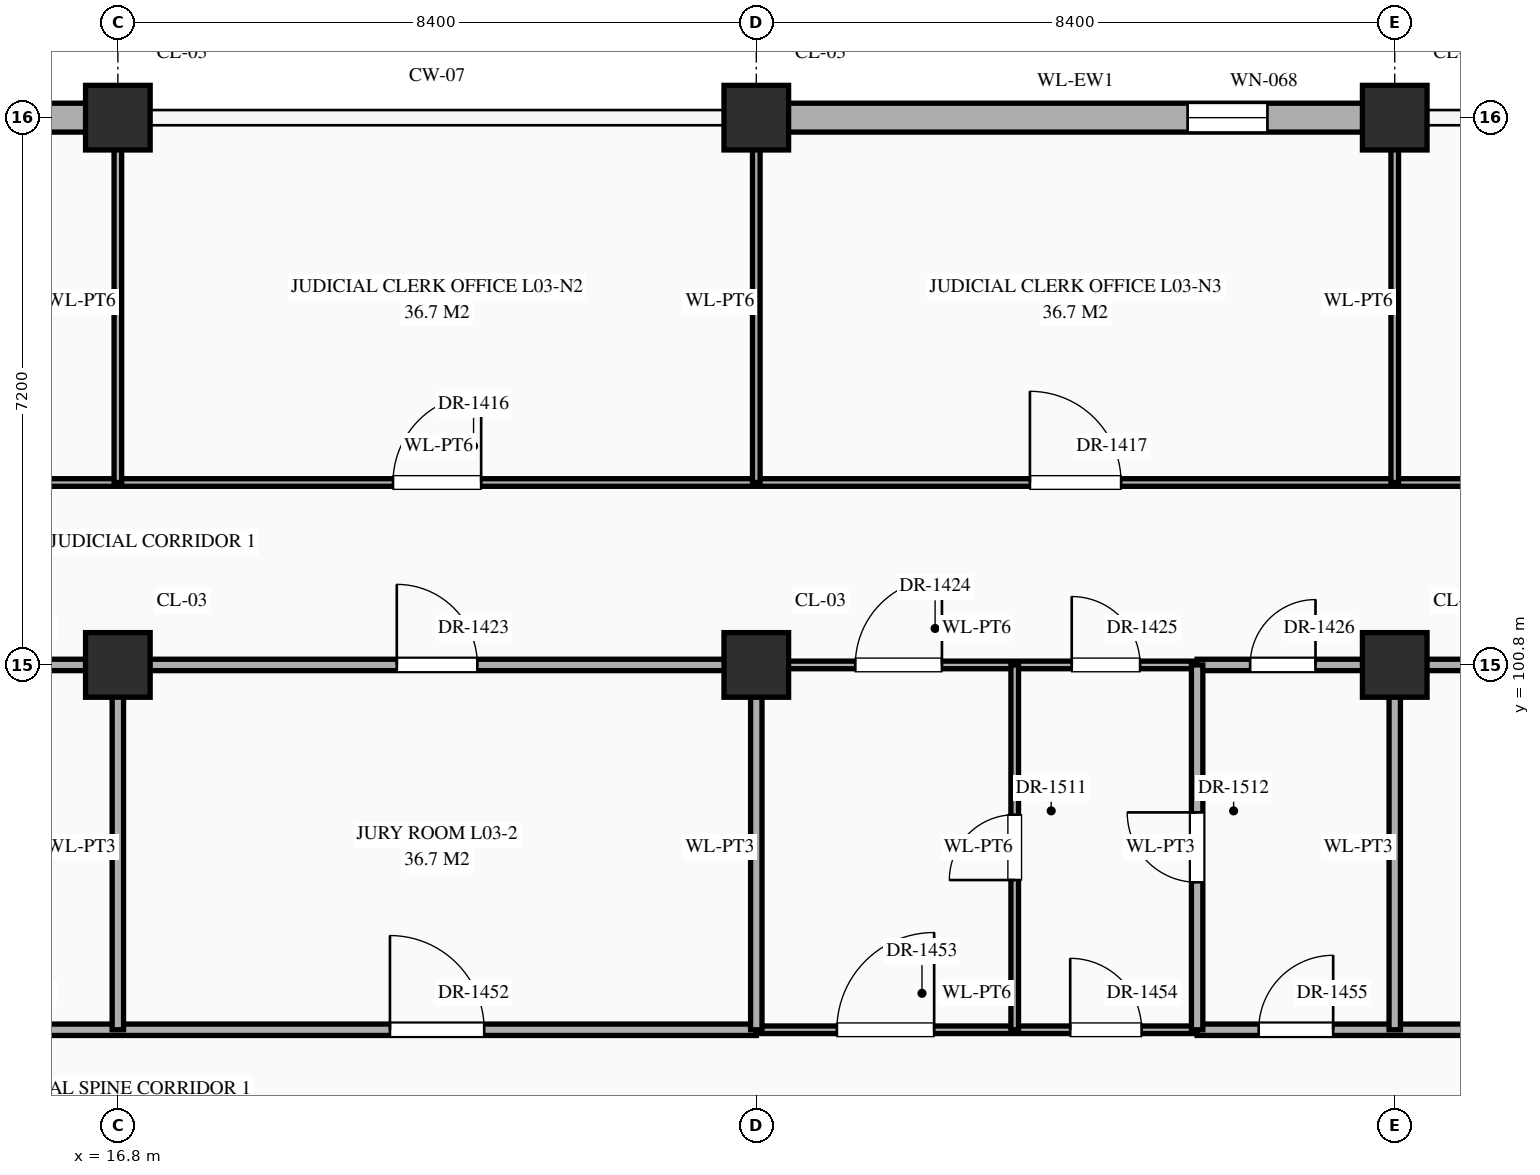
"""IFC4 building model, lengths in metres.
Left out: names, types, materials, properties, quantities, classifications, styles, units other than length and angle.
Written with IfcOpenShell. Run it as: python <this file> out.ifc"""

import sys

from ifc_helpers import new_model, si_unit, direction, frame, frame_2d, origin, origin_2d, place, context, subcontext, project, spatial, rectangle, extrude, element, fill, save


model = new_model("IFC4")
c1 = context("Model", 3, precision=1e-05, world=origin(), true_north=direction((0.0, 1.0)))
c2 = subcontext(c1, "Body", "Model", "MODEL_VIEW")
j1 = project(units=[si_unit("LENGTHUNIT", "METRE"), si_unit("PLANEANGLEUNIT", "RADIAN")], contexts=[c1])
p1 = place(None, origin())
s1 = spatial("IfcSite", under=j1, at=p1, CompositionType="ELEMENT")
p2 = place(p1, origin())
s2 = spatial("IfcBuilding", under=s1, at=p2, CompositionType="ELEMENT")
p3 = place(p2, frame((0.0, 0.0, 10.8)))
s3 = spatial("IfcBuildingStorey", under=s2, at=p3, CompositionType="ELEMENT", Elevation=10.8)
for number, where, z_axis, x_axis in (
    (1, (16.8, 100.8, 0.0), (0.0, 0.0, 1.0), (1.0, 0.0, 0.0)),
    (2, (16.8, 108.0, 0.0), (0.0, 0.0, 1.0), (1.0, 0.0, 0.0)),
    (3, (25.2, 100.8, 0.0), (0.0, 0.0, 1.0), (1.0, 0.0, 0.0)),
    (4, (25.2, 108.0, 0.0), (0.0, 0.0, 1.0), (1.0, 0.0, 0.0)),
    (5, (33.6, 100.8, 0.0), (0.0, 0.0, 1.0), (1.0, 0.0, 0.0)),
    (6, (33.6, 108.0, 0.0), (0.0, 0.0, 1.0), (1.0, 0.0, 0.0)),
):
    element("IfcColumn", number, at=place(p3, frame(where, z_axis=z_axis, x_axis=x_axis)), inside=s3, PredefinedType="COLUMN", context=c2, shape_type="SweptSolid", body=[
        extrude(rectangle(XDim=0.85, YDim=0.85, at=origin_2d()), origin(), (0.0, 0.0, 1.0), 5.4),
    ])
p4 = place(p3, frame((8.82, 108.0, 0.0), z_axis=(0.0, 0.0, 1.0), x_axis=(1.0, 0.0, 0.0)))
e7 = element("IfcWall", 7, at=p4, inside=s3, PredefinedType="STANDARD", context=c2, shape_type="SweptSolid", body=[
    extrude(rectangle(XDim=7.56, YDim=0.38, at=frame_2d((3.78, 0.0))), origin(), (0.0, 0.0, 1.0), 4.47),
])
p5 = place(p4, frame((5.33, 0.0, 0.85)))
e8 = element("IfcOpeningElement", 8, at=p5, cuts=e7, PredefinedType="OPENING", context=c2, shape_type="SweptSolid", body=[
    extrude(rectangle(XDim=0.9, YDim=1.92, at=frame_2d((0.45, 0.96))), frame((0.0, 0.202, 0.0), z_axis=(0.0, -1.0, 0.0), x_axis=(1.0, 0.0, 0.0)), (0.0, 0.0, 1.0), 0.404),
])
p6 = place(p3, frame((25.62, 108.0, 0.0), z_axis=(0.0, 0.0, 1.0), x_axis=(1.0, 0.0, 0.0)))
e9 = element("IfcWall", 9, at=p6, inside=s3, PredefinedType="STANDARD", context=c2, shape_type="SweptSolid", body=[
    extrude(rectangle(XDim=7.56, YDim=0.38, at=frame_2d((3.78, 0.0))), origin(), (0.0, 0.0, 1.0), 4.47),
])
p7 = place(p6, frame((5.255, 0.0, 0.85)))
e10 = element("IfcOpeningElement", 10, at=p7, cuts=e9, PredefinedType="OPENING", context=c2, shape_type="SweptSolid", body=[
    extrude(rectangle(XDim=1.05, YDim=1.2, at=frame_2d((0.525, 0.6))), frame((0.0, 0.202, 0.0), z_axis=(0.0, -1.0, 0.0), x_axis=(1.0, 0.0, 0.0)), (0.0, 0.0, 1.0), 0.404),
])
p8 = place(p3, frame((5.8, 96.0, 0.0), z_axis=(0.0, 0.0, 1.0), x_axis=(1.0, 0.0, 0.0)))
e11 = element("IfcWall", 11, at=p8, inside=s3, PredefinedType="STANDARD", context=c2, shape_type="SweptSolid", body=[
    extrude(rectangle(XDim=19.4, YDim=0.15, at=frame_2d((9.7, 0.0))), origin(), (0.0, 0.0, 1.0), 5.12),
])
p9 = place(p8, frame((0.72, 0.0, 0.0)))
e12 = element("IfcOpeningElement", 12, at=p9, cuts=e11, PredefinedType="OPENING", context=c2, shape_type="SweptSolid", body=[
    extrude(rectangle(XDim=1.16, YDim=2.3, at=frame_2d((0.58, 1.15))), frame((0.0, 0.087, 0.0), z_axis=(0.0, -1.0, 0.0), x_axis=(1.0, 0.0, 0.0)), (0.0, 0.0, 1.0), 0.174),
])
p10 = place(p8, frame((6.2, 0.0, 0.0)))
e13 = element("IfcOpeningElement", 13, at=p10, cuts=e11, PredefinedType="OPENING", context=c2, shape_type="SweptSolid", body=[
    extrude(rectangle(XDim=1.2, YDim=2.35, at=frame_2d((0.6, 1.175))), frame((0.0, 0.087, 0.0), z_axis=(0.0, -1.0, 0.0), x_axis=(1.0, 0.0, 0.0)), (0.0, 0.0, 1.0), 0.174),
])
p11 = place(p8, frame((14.58, 0.0, 0.0)))
e14 = element("IfcOpeningElement", 14, at=p11, cuts=e11, PredefinedType="OPENING", context=c2, shape_type="SweptSolid", body=[
    extrude(rectangle(XDim=1.24, YDim=2.3, at=frame_2d((0.62, 1.15))), frame((0.0, 0.087, 0.0), z_axis=(0.0, -1.0, 0.0), x_axis=(1.0, 0.0, 0.0)), (0.0, 0.0, 1.0), 0.174),
])
p12 = place(p3, frame((25.2, 96.0, 0.0), z_axis=(0.0, 0.0, 1.0), x_axis=(1.0, 0.0, 0.0)))
e15 = element("IfcWall", 15, at=p12, inside=s3, PredefinedType="STANDARD", context=c2, shape_type="SweptSolid", body=[
    extrude(rectangle(XDim=5.8, YDim=0.1, at=frame_2d((2.9, 0.0))), origin(), (0.0, 0.0, 1.0), 5.12),
])
p13 = place(p12, frame((1.06, 0.0, 0.0)))
e16 = element("IfcOpeningElement", 16, at=p13, cuts=e15, PredefinedType="OPENING", context=c2, shape_type="SweptSolid", body=[
    extrude(rectangle(XDim=1.28, YDim=2.35, at=frame_2d((0.64, 1.175))), frame((0.0, 0.062, 0.0), z_axis=(0.0, -1.0, 0.0), x_axis=(1.0, 0.0, 0.0)), (0.0, 0.0, 1.0), 0.124),
])
p14 = place(p12, frame((4.13, 0.0, 0.0)))
e17 = element("IfcOpeningElement", 17, at=p14, cuts=e15, PredefinedType="OPENING", context=c2, shape_type="SweptSolid", body=[
    extrude(rectangle(XDim=0.94, YDim=2.3, at=frame_2d((0.47, 1.15))), frame((0.0, 0.062, 0.0), z_axis=(0.0, -1.0, 0.0), x_axis=(1.0, 0.0, 0.0)), (0.0, 0.0, 1.0), 0.124),
])
p15 = place(p3, frame((31.0, 96.0, 0.0), z_axis=(0.0, 0.0, 1.0), x_axis=(1.0, 0.0, 0.0)))
e18 = element("IfcWall", 18, at=p15, inside=s3, PredefinedType="STANDARD", context=c2, shape_type="SweptSolid", body=[
    extrude(rectangle(XDim=19.4, YDim=0.15, at=frame_2d((9.7, 0.0))), origin(), (0.0, 0.0, 1.0), 5.12),
])
p16 = place(p15, frame((0.81, 0.0, 0.0)))
e19 = element("IfcOpeningElement", 19, at=p16, cuts=e18, PredefinedType="OPENING", context=c2, shape_type="SweptSolid", body=[
    extrude(rectangle(XDim=0.98, YDim=2.35, at=frame_2d((0.49, 1.175))), frame((0.0, 0.087, 0.0), z_axis=(0.0, -1.0, 0.0), x_axis=(1.0, 0.0, 0.0)), (0.0, 0.0, 1.0), 0.174),
])
p17 = place(p15, frame((6.29, 0.0, 0.0)))
e20 = element("IfcOpeningElement", 20, at=p17, cuts=e18, PredefinedType="OPENING", context=c2, shape_type="SweptSolid", body=[
    extrude(rectangle(XDim=1.02, YDim=2.4, at=frame_2d((0.51, 1.2))), frame((0.0, 0.087, 0.0), z_axis=(0.0, -1.0, 0.0), x_axis=(1.0, 0.0, 0.0)), (0.0, 0.0, 1.0), 0.174),
])
p18 = place(p15, frame((14.67, 0.0, 0.0)))
e21 = element("IfcOpeningElement", 21, at=p18, cuts=e18, PredefinedType="OPENING", context=c2, shape_type="SweptSolid", body=[
    extrude(rectangle(XDim=1.06, YDim=2.4, at=frame_2d((0.53, 1.2))), frame((0.0, 0.087, 0.0), z_axis=(0.0, -1.0, 0.0), x_axis=(1.0, 0.0, 0.0)), (0.0, 0.0, 1.0), 0.174),
])
p19 = place(p3, frame((5.8, 100.8, 0.0), z_axis=(0.0, 0.0, 1.0), x_axis=(1.0, 0.0, 0.0)))
e22 = element("IfcWall", 22, at=p19, inside=s3, PredefinedType="STANDARD", context=c2, shape_type="SweptSolid", body=[
    extrude(rectangle(XDim=19.4, YDim=0.15, at=frame_2d((9.7, 0.0))), origin(), (0.0, 0.0, 1.0), 4.27),
])
p20 = place(p19, frame((0.637, 0.0, 0.0)))
e23 = element("IfcOpeningElement", 23, at=p20, cuts=e22, PredefinedType="OPENING", context=c2, shape_type="SweptSolid", body=[
    extrude(rectangle(XDim=0.98, YDim=2.35, at=frame_2d((0.49, 1.175))), frame((0.0, 0.087, 0.0), z_axis=(0.0, -1.0, 0.0), x_axis=(1.0, 0.0, 0.0)), (0.0, 0.0, 1.0), 0.174),
])
p21 = place(p19, frame((6.29, 0.0, 0.0)))
e24 = element("IfcOpeningElement", 24, at=p21, cuts=e22, PredefinedType="OPENING", context=c2, shape_type="SweptSolid", body=[
    extrude(rectangle(XDim=1.02, YDim=2.4, at=frame_2d((0.51, 1.2))), frame((0.0, 0.087, 0.0), z_axis=(0.0, -1.0, 0.0), x_axis=(1.0, 0.0, 0.0)), (0.0, 0.0, 1.0), 0.174),
])
p22 = place(p19, frame((14.67, 0.0, 0.0)))
e25 = element("IfcOpeningElement", 25, at=p22, cuts=e22, PredefinedType="OPENING", context=c2, shape_type="SweptSolid", body=[
    extrude(rectangle(XDim=1.06, YDim=2.4, at=frame_2d((0.53, 1.2))), frame((0.0, 0.087, 0.0), z_axis=(0.0, -1.0, 0.0), x_axis=(1.0, 0.0, 0.0)), (0.0, 0.0, 1.0), 0.174),
])
p23 = place(p3, frame((25.2, 100.8, 0.0), z_axis=(0.0, 0.0, 1.0), x_axis=(1.0, 0.0, 0.0)))
e26 = element("IfcWall", 26, at=p23, inside=s3, PredefinedType="STANDARD", context=c2, shape_type="SweptSolid", body=[
    extrude(rectangle(XDim=5.8, YDim=0.1, at=frame_2d((2.9, 0.0))), origin(), (0.0, 0.0, 1.0), 4.27),
])
p24 = place(p23, frame((1.302, 0.0, 0.0)))
e27 = element("IfcOpeningElement", 27, at=p24, cuts=e26, PredefinedType="OPENING", context=c2, shape_type="SweptSolid", body=[
    extrude(rectangle(XDim=1.14, YDim=2.4, at=frame_2d((0.57, 1.2))), frame((0.0, 0.062, 0.0), z_axis=(0.0, -1.0, 0.0), x_axis=(1.0, 0.0, 0.0)), (0.0, 0.0, 1.0), 0.124),
])
p25 = place(p23, frame((4.15, 0.0, 0.0)))
e28 = element("IfcOpeningElement", 28, at=p25, cuts=e26, PredefinedType="OPENING", context=c2, shape_type="SweptSolid", body=[
    extrude(rectangle(XDim=0.9, YDim=2.15, at=frame_2d((0.45, 1.075))), frame((0.0, 0.062, 0.0), z_axis=(0.0, -1.0, 0.0), x_axis=(1.0, 0.0, 0.0)), (0.0, 0.0, 1.0), 0.124),
])
p26 = place(p3, frame((31.0, 100.8, 0.0), z_axis=(0.0, 0.0, 1.0), x_axis=(1.0, 0.0, 0.0)))
e29 = element("IfcWall", 29, at=p26, inside=s3, PredefinedType="STANDARD", context=c2, shape_type="SweptSolid", body=[
    extrude(rectangle(XDim=11.0, YDim=0.15, at=frame_2d((5.5, 0.0))), origin(), (0.0, 0.0, 1.0), 4.27),
])
p27 = place(p26, frame((0.698, 0.0, 0.0)))
e30 = element("IfcOpeningElement", 30, at=p27, cuts=e29, PredefinedType="OPENING", context=c2, shape_type="SweptSolid", body=[
    extrude(rectangle(XDim=0.86, YDim=2.1, at=frame_2d((0.43, 1.05))), frame((0.0, 0.087, 0.0), z_axis=(0.0, -1.0, 0.0), x_axis=(1.0, 0.0, 0.0)), (0.0, 0.0, 1.0), 0.174),
])
p28 = place(p26, frame((6.34, 0.0, 0.0)))
e31 = element("IfcOpeningElement", 31, at=p28, cuts=e29, PredefinedType="OPENING", context=c2, shape_type="SweptSolid", body=[
    extrude(rectangle(XDim=0.92, YDim=2.15, at=frame_2d((0.46, 1.075))), frame((0.0, 0.087, 0.0), z_axis=(0.0, -1.0, 0.0), x_axis=(1.0, 0.0, 0.0)), (0.0, 0.0, 1.0), 0.174),
])
p29 = place(p3, frame((0.04, 103.2, 0.0), z_axis=(0.0, 0.0, 1.0), x_axis=(1.0, 0.0, 0.0)))
e32 = element("IfcWall", 32, at=p29, inside=s3, PredefinedType="STANDARD", context=c2, shape_type="SweptSolid", body=[
    extrude(rectangle(XDim=41.96, YDim=0.1, at=frame_2d((20.98, 0.0))), origin(), (0.0, 0.0, 1.0), 5.12),
])
p30 = place(p29, frame((3.64, 0.0, 0.0)))
e33 = element("IfcOpeningElement", 33, at=p30, cuts=e32, PredefinedType="OPENING", context=c2, shape_type="SweptSolid", body=[
    extrude(rectangle(XDim=1.08, YDim=2.25, at=frame_2d((0.54, 1.125))), frame((0.0, 0.062, 0.0), z_axis=(0.0, -1.0, 0.0), x_axis=(1.0, 0.0, 0.0)), (0.0, 0.0, 1.0), 0.124),
])
p31 = place(p29, frame((12.0, 0.0, 0.0)))
e34 = element("IfcOpeningElement", 34, at=p31, cuts=e32, PredefinedType="OPENING", context=c2, shape_type="SweptSolid", body=[
    extrude(rectangle(XDim=1.12, YDim=2.25, at=frame_2d((0.56, 1.125))), frame((0.0, 0.062, 0.0), z_axis=(0.0, -1.0, 0.0), x_axis=(1.0, 0.0, 0.0)), (0.0, 0.0, 1.0), 0.124),
])
p32 = place(p29, frame((20.38, 0.0, 0.0)))
e35 = element("IfcOpeningElement", 35, at=p32, cuts=e32, PredefinedType="OPENING", context=c2, shape_type="SweptSolid", body=[
    extrude(rectangle(XDim=1.16, YDim=2.3, at=frame_2d((0.58, 1.15))), frame((0.0, 0.062, 0.0), z_axis=(0.0, -1.0, 0.0), x_axis=(1.0, 0.0, 0.0)), (0.0, 0.0, 1.0), 0.124),
])
p33 = place(p29, frame((28.76, 0.0, 0.0)))
e36 = element("IfcOpeningElement", 36, at=p33, cuts=e32, PredefinedType="OPENING", context=c2, shape_type="SweptSolid", body=[
    extrude(rectangle(XDim=1.2, YDim=2.35, at=frame_2d((0.6, 1.175))), frame((0.0, 0.062, 0.0), z_axis=(0.0, -1.0, 0.0), x_axis=(1.0, 0.0, 0.0)), (0.0, 0.0, 1.0), 0.124),
])
p34 = place(p29, frame((37.14, 0.0, 0.0)))
e37 = element("IfcOpeningElement", 37, at=p34, cuts=e32, PredefinedType="OPENING", context=c2, shape_type="SweptSolid", body=[
    extrude(rectangle(XDim=1.24, YDim=2.3, at=frame_2d((0.62, 1.15))), frame((0.0, 0.062, 0.0), z_axis=(0.0, -1.0, 0.0), x_axis=(1.0, 0.0, 0.0)), (0.0, 0.0, 1.0), 0.124),
])
p35 = place(p3, frame((16.8, 96.0, 0.0), z_axis=(0.0, 0.0, 1.0), x_axis=(0.0, 1.0, 0.0)))
e38 = element("IfcWall", 38, at=p35, inside=s3, PredefinedType="STANDARD", context=c2, shape_type="SweptSolid", body=[
    extrude(rectangle(XDim=4.8, YDim=0.15, at=frame_2d((2.4, 0.0))), origin(), (0.0, 0.0, 1.0), 4.37),
])
p36 = place(p3, frame((16.8, 103.2, 0.0), z_axis=(0.0, 0.0, 1.0), x_axis=(0.0, 1.0, 0.0)))
e39 = element("IfcWall", 39, at=p36, inside=s3, PredefinedType="STANDARD", context=c2, shape_type="SweptSolid", body=[
    extrude(rectangle(XDim=4.76, YDim=0.1, at=frame_2d((2.38, 0.0))), origin(), (0.0, 0.0, 1.0), 4.37),
])
p37 = place(p3, frame((25.2, 96.0, 0.0), z_axis=(0.0, 0.0, 1.0), x_axis=(0.0, 1.0, 0.0)))
e40 = element("IfcWall", 40, at=p37, inside=s3, PredefinedType="STANDARD", context=c2, shape_type="SweptSolid", body=[
    extrude(rectangle(XDim=4.8, YDim=0.15, at=frame_2d((2.4, 0.0))), origin(), (0.0, 0.0, 1.0), 4.37),
])
p38 = place(p3, frame((25.2, 103.2, 0.0), z_axis=(0.0, 0.0, 1.0), x_axis=(0.0, 1.0, 0.0)))
e41 = element("IfcWall", 41, at=p38, inside=s3, PredefinedType="STANDARD", context=c2, shape_type="SweptSolid", body=[
    extrude(rectangle(XDim=4.76, YDim=0.1, at=frame_2d((2.38, 0.0))), origin(), (0.0, 0.0, 1.0), 4.37),
])
p39 = place(p3, frame((28.6, 96.0, 0.0), z_axis=(0.0, 0.0, 1.0), x_axis=(0.0, 1.0, 0.0)))
e42 = element("IfcWall", 42, at=p39, inside=s3, PredefinedType="STANDARD", context=c2, shape_type="SweptSolid", body=[
    extrude(rectangle(XDim=4.8, YDim=0.1, at=frame_2d((2.4, 0.0))), origin(), (0.0, 0.0, 1.0), 5.12),
])
p40 = place(p39, frame((1.97, 0.0, 0.0)))
e43 = element("IfcOpeningElement", 43, at=p40, cuts=e42, PredefinedType="OPENING", context=c2, shape_type="SweptSolid", body=[
    extrude(rectangle(XDim=0.86, YDim=2.1, at=frame_2d((0.43, 1.05))), frame((0.0, 0.062, 0.0), z_axis=(0.0, -1.0, 0.0), x_axis=(1.0, 0.0, 0.0)), (0.0, 0.0, 1.0), 0.124),
])
p41 = place(p3, frame((31.0, 96.0, 0.0), z_axis=(0.0, 0.0, 1.0), x_axis=(0.0, 1.0, 0.0)))
e44 = element("IfcWall", 44, at=p41, inside=s3, PredefinedType="STANDARD", context=c2, shape_type="SweptSolid", body=[
    extrude(rectangle(XDim=4.8, YDim=0.15, at=frame_2d((2.4, 0.0))), origin(), (0.0, 0.0, 1.0), 5.12),
])
p42 = place(p41, frame((1.94, 0.0, 0.0)))
e45 = element("IfcOpeningElement", 45, at=p42, cuts=e44, PredefinedType="OPENING", context=c2, shape_type="SweptSolid", body=[
    extrude(rectangle(XDim=0.92, YDim=2.15, at=frame_2d((0.46, 1.075))), frame((0.0, 0.087, 0.0), z_axis=(0.0, -1.0, 0.0), x_axis=(1.0, 0.0, 0.0)), (0.0, 0.0, 1.0), 0.174),
])
p43 = place(p3, frame((33.6, 96.0, 0.0), z_axis=(0.0, 0.0, 1.0), x_axis=(0.0, 1.0, 0.0)))
e46 = element("IfcWall", 46, at=p43, inside=s3, PredefinedType="STANDARD", context=c2, shape_type="SweptSolid", body=[
    extrude(rectangle(XDim=4.8, YDim=0.15, at=frame_2d((2.4, 0.0))), origin(), (0.0, 0.0, 1.0), 4.37),
])
p44 = place(p3, frame((33.6, 103.2, 0.0), z_axis=(0.0, 0.0, 1.0), x_axis=(0.0, 1.0, 0.0)))
e47 = element("IfcWall", 47, at=p44, inside=s3, PredefinedType="STANDARD", context=c2, shape_type="SweptSolid", body=[
    extrude(rectangle(XDim=4.76, YDim=0.1, at=frame_2d((2.38, 0.0))), origin(), (0.0, 0.0, 1.0), 4.37),
])
p45 = place(p7, origin())
e48 = element("IfcWindow", 48, at=p45, inside=s3, PartitioningType="SINGLE_PANEL", PredefinedType="WINDOW", context=c2, shape_type="SweptSolid", body=[
    extrude(rectangle(XDim=1.05, YDim=1.2, at=frame_2d((0.525, 0.6))), frame((0.0, 0.03, 0.0), z_axis=(0.0, -1.0, 0.0), x_axis=(1.0, 0.0, 0.0)), (0.0, 0.0, 1.0), 0.06),
])
fill(e10, e48)
p46 = place(p32, origin())
e49 = element("IfcDoor", 49, at=p46, inside=s3, OperationType="SINGLE_SWING_RIGHT", PredefinedType="DOOR", context=c2, shape_type="SweptSolid", body=[
    extrude(rectangle(XDim=1.16, YDim=2.3, at=frame_2d((0.58, 1.15))), frame((0.0, 0.025, 0.0), z_axis=(0.0, -1.0, 0.0), x_axis=(1.0, 0.0, 0.0)), (0.0, 0.0, 1.0), 0.05),
])
fill(e35, e49)
p47 = place(p33, origin())
e50 = element("IfcDoor", 50, at=p47, inside=s3, OperationType="SINGLE_SWING_LEFT", PredefinedType="DOOR", context=c2, shape_type="SweptSolid", body=[
    extrude(rectangle(XDim=1.2, YDim=2.35, at=frame_2d((0.6, 1.175))), frame((0.0, 0.025, 0.0), z_axis=(0.0, -1.0, 0.0), x_axis=(1.0, 0.0, 0.0)), (0.0, 0.0, 1.0), 0.05),
])
fill(e36, e50)
p48 = place(p22, origin())
e51 = element("IfcDoor", 51, at=p48, inside=s3, OperationType="SINGLE_SWING_LEFT", PredefinedType="DOOR", context=c2, shape_type="SweptSolid", body=[
    extrude(rectangle(XDim=1.06, YDim=2.4, at=frame_2d((0.53, 1.2))), frame((0.0, 0.025, 0.0), z_axis=(0.0, -1.0, 0.0), x_axis=(1.0, 0.0, 0.0)), (0.0, 0.0, 1.0), 0.05),
])
fill(e25, e51)
p49 = place(p24, origin())
e52 = element("IfcDoor", 52, at=p49, inside=s3, OperationType="SINGLE_SWING_RIGHT", PredefinedType="DOOR", context=c2, shape_type="SweptSolid", body=[
    extrude(rectangle(XDim=1.14, YDim=2.4, at=frame_2d((0.57, 1.2))), frame((0.0, 0.025, 0.0), z_axis=(0.0, -1.0, 0.0), x_axis=(1.0, 0.0, 0.0)), (0.0, 0.0, 1.0), 0.05),
])
fill(e27, e52)
p50 = place(p25, origin())
e53 = element("IfcDoor", 53, at=p50, inside=s3, OperationType="SINGLE_SWING_LEFT", PredefinedType="DOOR", context=c2, shape_type="SweptSolid", body=[
    extrude(rectangle(XDim=0.9, YDim=2.15, at=frame_2d((0.45, 1.075))), frame((0.0, 0.025, 0.0), z_axis=(0.0, -1.0, 0.0), x_axis=(1.0, 0.0, 0.0)), (0.0, 0.0, 1.0), 0.05),
])
fill(e28, e53)
p51 = place(p27, origin())
e54 = element("IfcDoor", 54, at=p51, inside=s3, OperationType="SINGLE_SWING_RIGHT", PredefinedType="DOOR", context=c2, shape_type="SweptSolid", body=[
    extrude(rectangle(XDim=0.86, YDim=2.1, at=frame_2d((0.43, 1.05))), frame((0.0, 0.025, 0.0), z_axis=(0.0, -1.0, 0.0), x_axis=(1.0, 0.0, 0.0)), (0.0, 0.0, 1.0), 0.05),
])
fill(e30, e54)
p52 = place(p11, origin())
e55 = element("IfcDoor", 55, at=p52, inside=s3, OperationType="SINGLE_SWING_LEFT", PredefinedType="DOOR", context=c2, shape_type="SweptSolid", body=[
    extrude(rectangle(XDim=1.24, YDim=2.3, at=frame_2d((0.62, 1.15))), frame((0.0, 0.025, 0.0), z_axis=(0.0, -1.0, 0.0), x_axis=(1.0, 0.0, 0.0)), (0.0, 0.0, 1.0), 0.05),
])
fill(e14, e55)
p53 = place(p13, origin())
e56 = element("IfcDoor", 56, at=p53, inside=s3, OperationType="SINGLE_SWING_RIGHT", PredefinedType="DOOR", context=c2, shape_type="SweptSolid", body=[
    extrude(rectangle(XDim=1.28, YDim=2.35, at=frame_2d((0.64, 1.175))), frame((0.0, 0.025, 0.0), z_axis=(0.0, -1.0, 0.0), x_axis=(1.0, 0.0, 0.0)), (0.0, 0.0, 1.0), 0.05),
])
fill(e16, e56)
p54 = place(p14, origin())
e57 = element("IfcDoor", 57, at=p54, inside=s3, OperationType="SINGLE_SWING_LEFT", PredefinedType="DOOR", context=c2, shape_type="SweptSolid", body=[
    extrude(rectangle(XDim=0.94, YDim=2.3, at=frame_2d((0.47, 1.15))), frame((0.0, 0.025, 0.0), z_axis=(0.0, -1.0, 0.0), x_axis=(1.0, 0.0, 0.0)), (0.0, 0.0, 1.0), 0.05),
])
fill(e17, e57)
p55 = place(p16, origin())
e58 = element("IfcDoor", 58, at=p55, inside=s3, OperationType="SINGLE_SWING_RIGHT", PredefinedType="DOOR", context=c2, shape_type="SweptSolid", body=[
    extrude(rectangle(XDim=0.98, YDim=2.35, at=frame_2d((0.49, 1.175))), frame((0.0, 0.025, 0.0), z_axis=(0.0, -1.0, 0.0), x_axis=(1.0, 0.0, 0.0)), (0.0, 0.0, 1.0), 0.05),
])
fill(e19, e58)
p56 = place(p40, origin())
e59 = element("IfcDoor", 59, at=p56, inside=s3, OperationType="SINGLE_SWING_LEFT", PredefinedType="DOOR", context=c2, shape_type="SweptSolid", body=[
    extrude(rectangle(XDim=0.86, YDim=2.1, at=frame_2d((0.43, 1.05))), frame((0.0, 0.025, 0.0), z_axis=(0.0, -1.0, 0.0), x_axis=(1.0, 0.0, 0.0)), (0.0, 0.0, 1.0), 0.05),
])
fill(e43, e59)
p57 = place(p42, origin())
e60 = element("IfcDoor", 60, at=p57, inside=s3, OperationType="SINGLE_SWING_RIGHT", PredefinedType="DOOR", context=c2, shape_type="SweptSolid", body=[
    extrude(rectangle(XDim=0.92, YDim=2.15, at=frame_2d((0.46, 1.075))), frame((0.0, 0.025, 0.0), z_axis=(0.0, -1.0, 0.0), x_axis=(1.0, 0.0, 0.0)), (0.0, 0.0, 1.0), 0.05),
])
fill(e45, e60)
save(model, sys.argv[1])
